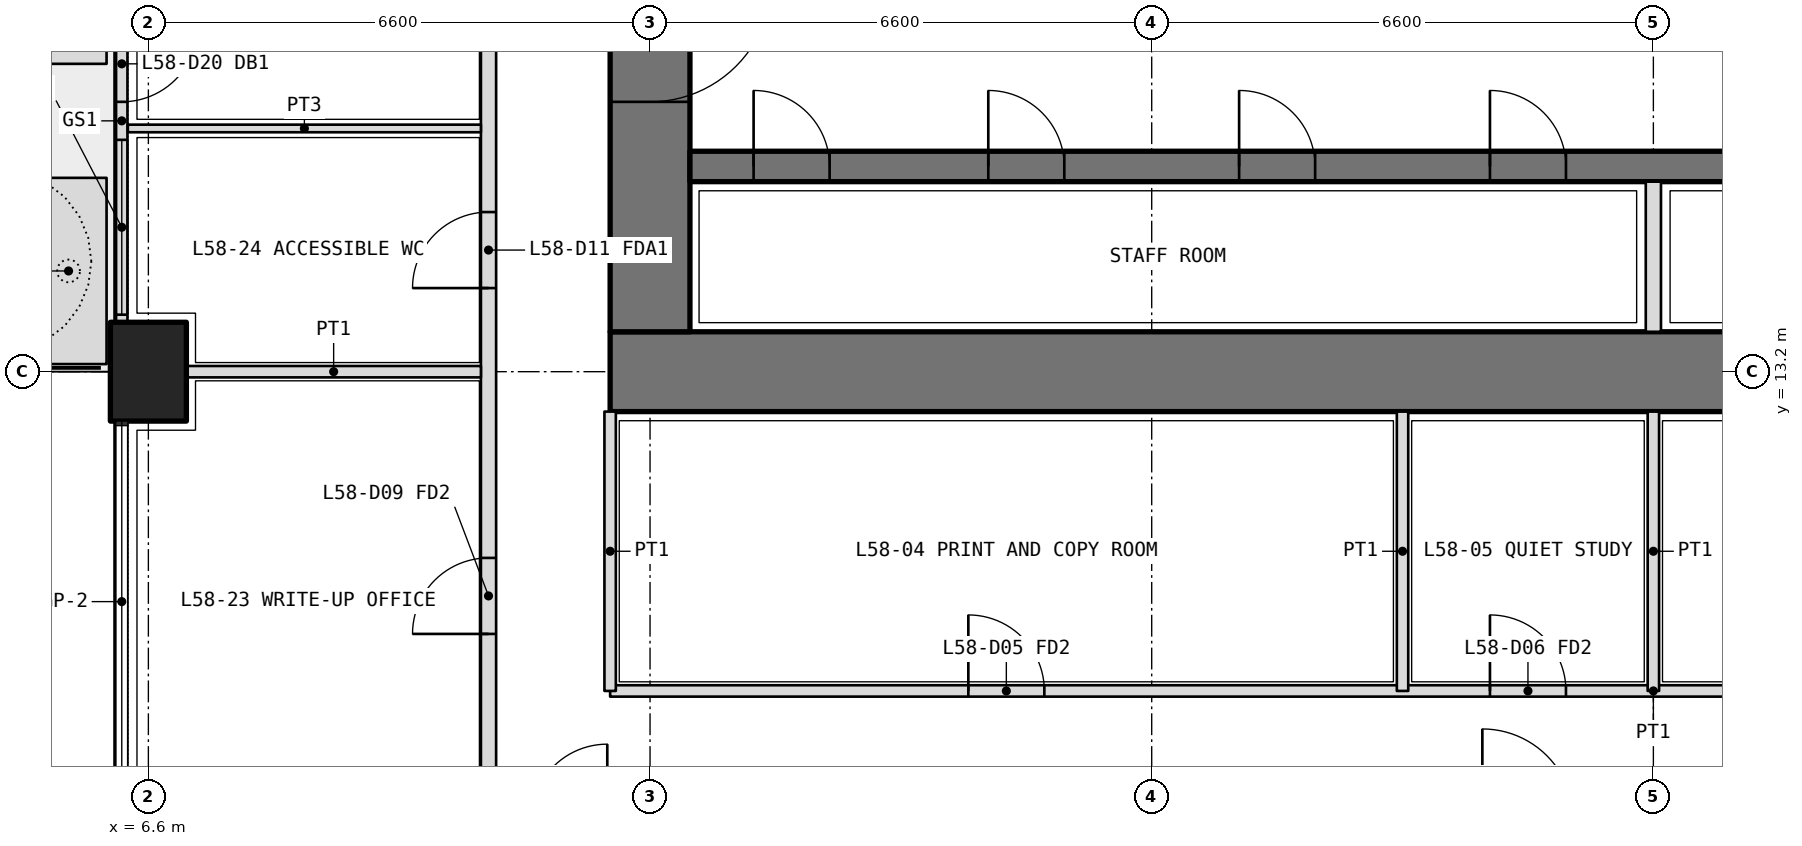
"""IFC4 building model, lengths in metres.
Left out: names, types, materials, properties, quantities, classifications, styles, units other than length and angle.
Written with IfcOpenShell. Run it as: python <this file> out.ifc"""

import sys

from ifc_helpers import new_model, si_unit, direction, frame, frame_2d, origin, origin_2d, place, context, subcontext, project, spatial, polyline, rectangle, outline, extrude, element, fill, save


model = new_model("IFC4")
c1 = context("Model", 3, precision=1e-05, world=origin(), true_north=direction((0.0, 1.0)))
c2 = subcontext(c1, "Body", "Model", "MODEL_VIEW")
j1 = project(units=[si_unit("LENGTHUNIT", "METRE"), si_unit("PLANEANGLEUNIT", "RADIAN")], contexts=[c1])
p1 = place(None, origin())
s1 = spatial("IfcSite", under=j1, at=p1, CompositionType="ELEMENT")
p2 = place(p1, origin())
s2 = spatial("IfcBuilding", under=s1, at=p2, CompositionType="ELEMENT")
p3 = place(p2, frame((0.0, 0.0, 254.4)))
s3 = spatial("IfcBuildingStorey", under=s2, at=p3, CompositionType="ELEMENT", Elevation=254.4)
p4 = place(p3, frame((6.6, 13.2, 0.0), z_axis=(0.0, 0.0, 1.0), x_axis=(0.0, 1.0, 0.0)))
e1 = element("IfcColumn", 1, at=p4, inside=s3, PredefinedType="COLUMN", context=c2, shape_type="SweptSolid", body=[
    extrude(rectangle(XDim=1.3, YDim=1.0, at=origin_2d()), origin(), (0.0, 0.0, 1.0), 4.2),
])
p5 = place(p3, origin())
e2 = element("IfcWall", 2, at=p5, inside=s3, PredefinedType="USERDEFINED", context=c2, shape_type="SweptSolid", body=[
    extrude(outline(polyline([(5.05, 13.3), (6.05, 13.3), (6.05, 15.75), (5.05, 15.75), (5.05, 13.3)]), holes=[polyline([(5.2, 13.45), (5.9, 13.45), (5.9, 15.6), (5.2, 15.6), (5.2, 13.45)])]), origin(), (0.0, 0.0, 1.0), 1.05),
])
p6 = place(p3, origin())
e3 = element("IfcWall", 3, at=p6, inside=s3, PredefinedType="USERDEFINED", context=c2, shape_type="SweptSolid", body=[
    extrude(outline(polyline([(5.05, 17.25), (6.05, 17.25), (6.05, 26.3), (5.05, 26.3), (5.05, 17.25)]), holes=[polyline([(5.2, 17.4), (5.9, 17.4), (5.9, 26.15), (5.2, 26.15), (5.2, 17.4)])]), origin(), (0.0, 0.0, 1.0), 1.05),
])
p7 = place(p3, frame((6.25, 19.15, 0.0), z_axis=(0.0, 0.0, 1.0), x_axis=(0.0, -1.0, 0.0)))
e4 = element("IfcWall", 4, at=p7, inside=s3, PredefinedType="SOLIDWALL", context=c2, shape_type="SweptSolid", body=[
    extrude(rectangle(XDim=5.3, YDim=0.15, at=frame_2d((2.65, 0.0))), origin(), (0.0, 0.0, 1.0), 2.7),
])
p8 = place(p7, frame((1.4, 0.0, 0.0)))
e5 = element("IfcOpeningElement", 5, at=p8, cuts=e4, PredefinedType="OPENING", context=c2, shape_type="SweptSolid", body=[
    extrude(rectangle(XDim=1.0, YDim=2.4, at=frame_2d((0.5, 1.2))), frame((0.0, 0.085, 0.0), z_axis=(0.0, -1.0, 0.0), x_axis=(1.0, 0.0, 0.0)), (0.0, 0.0, 1.0), 0.17),
])
p9 = place(p7, frame((0.1, 0.0, 0.1)))
e6 = element("IfcOpeningElement", 6, at=p9, cuts=e4, PredefinedType="OPENING", context=c2, shape_type="SweptSolid", body=[
    extrude(rectangle(XDim=1.2, YDim=2.3, at=frame_2d((0.6, 1.15))), frame((0.0, 0.085, 0.0), z_axis=(0.0, -1.0, 0.0), x_axis=(1.0, 0.0, 0.0)), (0.0, 0.0, 1.0), 0.17),
])
p10 = place(p7, frame((2.9, 0.0, 0.1)))
e7 = element("IfcOpeningElement", 7, at=p10, cuts=e4, PredefinedType="OPENING", context=c2, shape_type="SweptSolid", body=[
    extrude(rectangle(XDim=2.3, YDim=2.3, at=frame_2d((1.15, 1.15))), frame((0.0, 0.085, 0.0), z_axis=(0.0, -1.0, 0.0), x_axis=(1.0, 0.0, 0.0)), (0.0, 0.0, 1.0), 0.17),
])
p11 = place(p3, frame((12.675, 13.2, 0.0), z_axis=(0.0, 0.0, 1.0), x_axis=(1.0, 0.0, 0.0)))
e8 = element("IfcWall", 8, at=p11, inside=s3, PredefinedType="SHEAR", context=c2, shape_type="SweptSolid", body=[
    extrude(rectangle(XDim=27.45, YDim=1.05, at=frame_2d((13.725, 0.0))), origin(), (0.0, 0.0, 1.0), 4.2),
])
p12 = place(p3, frame((13.2, 32.475, 0.0), z_axis=(0.0, 0.0, 1.0), x_axis=(0.0, -1.0, 0.0)))
e9 = element("IfcWall", 9, at=p12, inside=s3, PredefinedType="SHEAR", context=c2, shape_type="SweptSolid", body=[
    extrude(rectangle(XDim=18.75, YDim=1.05, at=frame_2d((9.375, 0.0))), origin(), (0.0, 0.0, 1.0), 4.2),
])
p13 = place(p12, frame((14.125, 0.0, 0.0)))
e10 = element("IfcOpeningElement", 10, at=p13, cuts=e9, PredefinedType="OPENING", context=c2, shape_type="SweptSolid", body=[
    extrude(rectangle(XDim=1.6, YDim=2.1, at=frame_2d((0.8, 1.05))), frame((0.0, 0.535, 0.0), z_axis=(0.0, -1.0, 0.0), x_axis=(1.0, 0.0, 0.0)), (0.0, 0.0, 1.0), 1.07),
])
p14 = place(p12, frame((3.325, 0.0, 0.0)))
e11 = element("IfcOpeningElement", 11, at=p14, cuts=e9, PredefinedType="OPENING", context=c2, shape_type="SweptSolid", body=[
    extrude(rectangle(XDim=1.6, YDim=2.1, at=frame_2d((0.8, 1.05))), frame((0.0, 0.535, 0.0), z_axis=(0.0, -1.0, 0.0), x_axis=(1.0, 0.0, 0.0)), (0.0, 0.0, 1.0), 1.07),
])
p15 = place(p3, frame((13.725, 15.9, 0.0), z_axis=(0.0, 0.0, 1.0), x_axis=(1.0, 0.0, 0.0)))
e12 = element("IfcWall", 12, at=p15, inside=s3, PredefinedType="SHEAR", context=c2, shape_type="SweptSolid", body=[
    extrude(rectangle(XDim=25.35, YDim=0.4, at=frame_2d((12.675, 0.0))), origin(), (0.0, 0.0, 1.0), 4.2),
])
p16 = place(p15, frame((0.837, 0.0, 0.0)))
e13 = element("IfcOpeningElement", 13, at=p16, cuts=e12, PredefinedType="OPENING", context=c2, shape_type="SweptSolid", body=[
    extrude(rectangle(XDim=1.0, YDim=2.1, at=frame_2d((0.5, 1.05))), frame((0.0, 0.21, 0.0), z_axis=(0.0, -1.0, 0.0), x_axis=(1.0, 0.0, 0.0)), (0.0, 0.0, 1.0), 0.42),
])
p17 = place(p15, frame((3.925, 0.0, 0.0)))
e14 = element("IfcOpeningElement", 14, at=p17, cuts=e12, PredefinedType="OPENING", context=c2, shape_type="SweptSolid", body=[
    extrude(rectangle(XDim=1.0, YDim=2.1, at=frame_2d((0.5, 1.05))), frame((0.0, 0.21, 0.0), z_axis=(0.0, -1.0, 0.0), x_axis=(1.0, 0.0, 0.0)), (0.0, 0.0, 1.0), 0.42),
])
p18 = place(p15, frame((7.225, 0.0, 0.0)))
e15 = element("IfcOpeningElement", 15, at=p18, cuts=e12, PredefinedType="OPENING", context=c2, shape_type="SweptSolid", body=[
    extrude(rectangle(XDim=1.0, YDim=2.1, at=frame_2d((0.5, 1.05))), frame((0.0, 0.21, 0.0), z_axis=(0.0, -1.0, 0.0), x_axis=(1.0, 0.0, 0.0)), (0.0, 0.0, 1.0), 0.42),
])
p19 = place(p15, frame((10.525, 0.0, 0.0)))
e16 = element("IfcOpeningElement", 16, at=p19, cuts=e12, PredefinedType="OPENING", context=c2, shape_type="SweptSolid", body=[
    extrude(rectangle(XDim=1.0, YDim=2.1, at=frame_2d((0.5, 1.05))), frame((0.0, 0.21, 0.0), z_axis=(0.0, -1.0, 0.0), x_axis=(1.0, 0.0, 0.0)), (0.0, 0.0, 1.0), 0.42),
])
p20 = place(p15, frame((13.825, 0.0, 0.0)))
e17 = element("IfcOpeningElement", 17, at=p20, cuts=e12, PredefinedType="OPENING", context=c2, shape_type="SweptSolid", body=[
    extrude(rectangle(XDim=1.0, YDim=2.1, at=frame_2d((0.5, 1.05))), frame((0.0, 0.21, 0.0), z_axis=(0.0, -1.0, 0.0), x_axis=(1.0, 0.0, 0.0)), (0.0, 0.0, 1.0), 0.42),
])
p21 = place(p15, frame((17.125, 0.0, 0.0)))
e18 = element("IfcOpeningElement", 18, at=p21, cuts=e12, PredefinedType="OPENING", context=c2, shape_type="SweptSolid", body=[
    extrude(rectangle(XDim=1.0, YDim=2.1, at=frame_2d((0.5, 1.05))), frame((0.0, 0.21, 0.0), z_axis=(0.0, -1.0, 0.0), x_axis=(1.0, 0.0, 0.0)), (0.0, 0.0, 1.0), 0.42),
])
p22 = place(p15, frame((20.425, 0.0, 0.0)))
e19 = element("IfcOpeningElement", 19, at=p22, cuts=e12, PredefinedType="OPENING", context=c2, shape_type="SweptSolid", body=[
    extrude(rectangle(XDim=1.0, YDim=2.1, at=frame_2d((0.5, 1.05))), frame((0.0, 0.21, 0.0), z_axis=(0.0, -1.0, 0.0), x_axis=(1.0, 0.0, 0.0)), (0.0, 0.0, 1.0), 0.42),
])
p23 = place(p15, frame((23.512, 0.0, 0.0)))
e20 = element("IfcOpeningElement", 20, at=p23, cuts=e12, PredefinedType="OPENING", context=c2, shape_type="SweptSolid", body=[
    extrude(rectangle(XDim=1.0, YDim=2.1, at=frame_2d((0.5, 1.05))), frame((0.0, 0.21, 0.0), z_axis=(0.0, -1.0, 0.0), x_axis=(1.0, 0.0, 0.0)), (0.0, 0.0, 1.0), 0.42),
])
p24 = place(p3, frame((26.4, 13.725, 0.0), z_axis=(0.0, 0.0, 1.0), x_axis=(0.0, 1.0, 0.0)))
e21 = element("IfcWall", 21, at=p24, inside=s3, PredefinedType="PARTITIONING", context=c2, shape_type="SweptSolid", body=[
    extrude(rectangle(XDim=1.975, YDim=0.2, at=frame_2d((0.987, 0.0))), origin(), (0.0, 0.0, 1.0), 4.2),
])
p25 = place(p3, frame((12.675, 9.0, 0.0), z_axis=(0.0, 0.0, 1.0), x_axis=(1.0, 0.0, 0.0)))
e22 = element("IfcWall", 22, at=p25, inside=s3, PredefinedType="PARTITIONING", context=c2, shape_type="SweptSolid", body=[
    extrude(rectangle(XDim=27.45, YDim=0.15, at=frame_2d((13.725, 0.0))), origin(), (0.0, 0.0, 1.0), 3.0),
])
p26 = place(p25, frame((4.712, 0.0, 0.0)))
e23 = element("IfcOpeningElement", 23, at=p26, cuts=e22, PredefinedType="OPENING", context=c2, shape_type="SweptSolid", body=[
    extrude(rectangle(XDim=1.0, YDim=2.1, at=frame_2d((0.5, 1.05))), frame((0.0, 0.085, 0.0), z_axis=(0.0, -1.0, 0.0), x_axis=(1.0, 0.0, 0.0)), (0.0, 0.0, 1.0), 0.17),
])
p27 = place(p25, frame((11.575, 0.0, 0.0)))
e24 = element("IfcOpeningElement", 24, at=p27, cuts=e22, PredefinedType="OPENING", context=c2, shape_type="SweptSolid", body=[
    extrude(rectangle(XDim=1.0, YDim=2.1, at=frame_2d((0.5, 1.05))), frame((0.0, 0.085, 0.0), z_axis=(0.0, -1.0, 0.0), x_axis=(1.0, 0.0, 0.0)), (0.0, 0.0, 1.0), 0.17),
])
p28 = place(p25, frame((18.175, 0.0, 0.0)))
e25 = element("IfcOpeningElement", 25, at=p28, cuts=e22, PredefinedType="OPENING", context=c2, shape_type="SweptSolid", body=[
    extrude(rectangle(XDim=1.0, YDim=2.1, at=frame_2d((0.5, 1.05))), frame((0.0, 0.085, 0.0), z_axis=(0.0, -1.0, 0.0), x_axis=(1.0, 0.0, 0.0)), (0.0, 0.0, 1.0), 0.17),
])
p29 = place(p25, frame((25.038, 0.0, 0.0)))
e26 = element("IfcOpeningElement", 26, at=p29, cuts=e22, PredefinedType="OPENING", context=c2, shape_type="SweptSolid", body=[
    extrude(rectangle(XDim=1.0, YDim=2.1, at=frame_2d((0.5, 1.05))), frame((0.0, 0.085, 0.0), z_axis=(0.0, -1.0, 0.0), x_axis=(1.0, 0.0, 0.0)), (0.0, 0.0, 1.0), 0.17),
])
p30 = place(p3, frame((12.675, 12.675, 0.0), z_axis=(0.0, 0.0, 1.0), x_axis=(0.0, -1.0, 0.0)))
e27 = element("IfcWall", 27, at=p30, inside=s3, PredefinedType="PARTITIONING", context=c2, shape_type="SweptSolid", body=[
    extrude(rectangle(XDim=3.675, YDim=0.15, at=frame_2d((1.837, 0.0))), origin(), (0.0, 0.0, 1.0), 3.0),
])
p31 = place(p3, frame((23.1, 12.675, 0.0), z_axis=(0.0, 0.0, 1.0), x_axis=(0.0, -1.0, 0.0)))
e28 = element("IfcWall", 28, at=p31, inside=s3, PredefinedType="PARTITIONING", context=c2, shape_type="SweptSolid", body=[
    extrude(rectangle(XDim=3.675, YDim=0.15, at=frame_2d((1.837, 0.0))), origin(), (0.0, 0.0, 1.0), 3.9),
])
p32 = place(p3, frame((26.4, 12.675, 0.0), z_axis=(0.0, 0.0, 1.0), x_axis=(0.0, -1.0, 0.0)))
e29 = element("IfcWall", 29, at=p32, inside=s3, PredefinedType="PARTITIONING", context=c2, shape_type="SweptSolid", body=[
    extrude(rectangle(XDim=3.675, YDim=0.15, at=frame_2d((1.837, 0.0))), origin(), (0.0, 0.0, 1.0), 3.0),
])
p33 = place(p3, frame((11.075, 7.4, 0.0), z_axis=(0.0, 0.0, 1.0), x_axis=(0.0, 1.0, 0.0)))
e30 = element("IfcWall", 30, at=p33, inside=s3, PredefinedType="PARTITIONING", context=c2, shape_type="SweptSolid", body=[
    extrude(rectangle(XDim=31.4, YDim=0.2, at=frame_2d((15.7, 0.0))), origin(), (0.0, 0.0, 1.0), 3.0),
])
p34 = place(p33, frame((2.35, 0.0, 0.0)))
e31 = element("IfcOpeningElement", 31, at=p34, cuts=e30, PredefinedType="OPENING", context=c2, shape_type="SweptSolid", body=[
    extrude(rectangle(XDim=1.0, YDim=2.1, at=frame_2d((0.5, 1.05))), frame((0.0, 0.11, 0.0), z_axis=(0.0, -1.0, 0.0), x_axis=(1.0, 0.0, 0.0)), (0.0, 0.0, 1.0), 0.22),
])
p35 = place(p33, frame((6.9, 0.0, 0.0)))
e32 = element("IfcOpeningElement", 32, at=p35, cuts=e30, PredefinedType="OPENING", context=c2, shape_type="SweptSolid", body=[
    extrude(rectangle(XDim=1.0, YDim=2.1, at=frame_2d((0.5, 1.05))), frame((0.0, 0.11, 0.0), z_axis=(0.0, -1.0, 0.0), x_axis=(1.0, 0.0, 0.0)), (0.0, 0.0, 1.0), 0.22),
])
p36 = place(p33, frame((10.35, 0.0, 0.0)))
e33 = element("IfcOpeningElement", 33, at=p36, cuts=e30, PredefinedType="OPENING", context=c2, shape_type="SweptSolid", body=[
    extrude(rectangle(XDim=0.9, YDim=2.1, at=frame_2d((0.45, 1.05))), frame((0.0, 0.11, 0.0), z_axis=(0.0, -1.0, 0.0), x_axis=(1.0, 0.0, 0.0)), (0.0, 0.0, 1.0), 0.22),
])
p37 = place(p33, frame((13.7, 0.0, 0.0)))
e34 = element("IfcOpeningElement", 34, at=p37, cuts=e30, PredefinedType="OPENING", context=c2, shape_type="SweptSolid", body=[
    extrude(rectangle(XDim=0.9, YDim=2.1, at=frame_2d((0.45, 1.05))), frame((0.0, 0.11, 0.0), z_axis=(0.0, -1.0, 0.0), x_axis=(1.0, 0.0, 0.0)), (0.0, 0.0, 1.0), 0.22),
])
p38 = place(p33, frame((16.85, 0.0, 0.0)))
e35 = element("IfcOpeningElement", 35, at=p38, cuts=e30, PredefinedType="OPENING", context=c2, shape_type="SweptSolid", body=[
    extrude(rectangle(XDim=1.0, YDim=2.1, at=frame_2d((0.5, 1.05))), frame((0.0, 0.11, 0.0), z_axis=(0.0, -1.0, 0.0), x_axis=(1.0, 0.0, 0.0)), (0.0, 0.0, 1.0), 0.22),
])
p39 = place(p33, frame((24.75, 0.0, 0.0)))
e36 = element("IfcOpeningElement", 36, at=p39, cuts=e30, PredefinedType="OPENING", context=c2, shape_type="SweptSolid", body=[
    extrude(rectangle(XDim=1.0, YDim=2.1, at=frame_2d((0.5, 1.05))), frame((0.0, 0.11, 0.0), z_axis=(0.0, -1.0, 0.0), x_axis=(1.0, 0.0, 0.0)), (0.0, 0.0, 1.0), 0.22),
])
p40 = place(p3, frame((6.33, 16.4, 0.0), z_axis=(0.0, 0.0, 1.0), x_axis=(1.0, 0.0, 0.0)))
e37 = element("IfcWall", 37, at=p40, inside=s3, PredefinedType="PARTITIONING", context=c2, shape_type="SweptSolid", body=[
    extrude(rectangle(XDim=4.645, YDim=0.1, at=frame_2d((2.323, 0.0))), origin(), (0.0, 0.0, 1.0), 2.7),
])
p41 = place(p3, frame((7.1, 13.2, 0.0), z_axis=(0.0, 0.0, 1.0), x_axis=(1.0, 0.0, 0.0)))
e38 = element("IfcWall", 38, at=p41, inside=s3, PredefinedType="PARTITIONING", context=c2, shape_type="SweptSolid", body=[
    extrude(rectangle(XDim=3.875, YDim=0.15, at=frame_2d((1.938, 0.0))), origin(), (0.0, 0.0, 1.0), 3.0),
])
p42 = place(p8, origin())
e39 = element("IfcDoor", 39, at=p42, inside=s3, OperationType="SINGLE_SWING_LEFT", PredefinedType="DOOR", context=c2, shape_type="SweptSolid", body=[
    extrude(rectangle(XDim=1.0, YDim=2.4, at=frame_2d((0.5, 1.2))), frame((0.0, 0.025, 0.0), z_axis=(0.0, -1.0, 0.0), x_axis=(1.0, 0.0, 0.0)), (0.0, 0.0, 1.0), 0.05),
])
fill(e5, e39)
p43 = place(p10, origin())
e40 = element("IfcWindow", 40, at=p43, inside=s3, PartitioningType="SINGLE_PANEL", PredefinedType="WINDOW", context=c2, shape_type="SweptSolid", body=[
    extrude(rectangle(XDim=2.3, YDim=2.3, at=frame_2d((1.15, 1.15))), frame((0.0, 0.03, 0.0), z_axis=(0.0, -1.0, 0.0), x_axis=(1.0, 0.0, 0.0)), (0.0, 0.0, 1.0), 0.06),
])
fill(e7, e40)
p44 = place(p26, origin())
e41 = element("IfcDoor", 41, at=p44, inside=s3, OperationType="SINGLE_SWING_LEFT", PredefinedType="DOOR", context=c2, shape_type="SweptSolid", body=[
    extrude(rectangle(XDim=1.0, YDim=2.1, at=frame_2d((0.5, 1.05))), frame((0.0, 0.025, 0.0), z_axis=(0.0, -1.0, 0.0), x_axis=(1.0, 0.0, 0.0)), (0.0, 0.0, 1.0), 0.05),
])
fill(e23, e41)
p45 = place(p27, origin())
e42 = element("IfcDoor", 42, at=p45, inside=s3, OperationType="SINGLE_SWING_LEFT", PredefinedType="DOOR", context=c2, shape_type="SweptSolid", body=[
    extrude(rectangle(XDim=1.0, YDim=2.1, at=frame_2d((0.5, 1.05))), frame((0.0, 0.025, 0.0), z_axis=(0.0, -1.0, 0.0), x_axis=(1.0, 0.0, 0.0)), (0.0, 0.0, 1.0), 0.05),
])
fill(e24, e42)
p46 = place(p34, origin())
e43 = element("IfcDoor", 43, at=p46, inside=s3, OperationType="SINGLE_SWING_LEFT", PredefinedType="DOOR", context=c2, shape_type="SweptSolid", body=[
    extrude(rectangle(XDim=1.0, YDim=2.1, at=frame_2d((0.5, 1.05))), frame((0.0, 0.025, 0.0), z_axis=(0.0, -1.0, 0.0), x_axis=(1.0, 0.0, 0.0)), (0.0, 0.0, 1.0), 0.05),
])
fill(e31, e43)
p47 = place(p35, origin())
e44 = element("IfcDoor", 44, at=p47, inside=s3, OperationType="SINGLE_SWING_LEFT", PredefinedType="DOOR", context=c2, shape_type="SweptSolid", body=[
    extrude(rectangle(XDim=1.0, YDim=2.1, at=frame_2d((0.5, 1.05))), frame((0.0, 0.025, 0.0), z_axis=(0.0, -1.0, 0.0), x_axis=(1.0, 0.0, 0.0)), (0.0, 0.0, 1.0), 0.05),
])
fill(e32, e44)
p48 = place(p16, origin())
e45 = element("IfcDoor", 45, at=p48, inside=s3, OperationType="SINGLE_SWING_LEFT", PredefinedType="DOOR", context=c2, shape_type="SweptSolid", body=[
    extrude(rectangle(XDim=1.0, YDim=2.1, at=frame_2d((0.5, 1.05))), frame((0.0, 0.025, 0.0), z_axis=(0.0, -1.0, 0.0), x_axis=(1.0, 0.0, 0.0)), (0.0, 0.0, 1.0), 0.05),
])
fill(e13, e45)
p49 = place(p17, origin())
e46 = element("IfcDoor", 46, at=p49, inside=s3, OperationType="SINGLE_SWING_LEFT", PredefinedType="DOOR", context=c2, shape_type="SweptSolid", body=[
    extrude(rectangle(XDim=1.0, YDim=2.1, at=frame_2d((0.5, 1.05))), frame((0.0, 0.025, 0.0), z_axis=(0.0, -1.0, 0.0), x_axis=(1.0, 0.0, 0.0)), (0.0, 0.0, 1.0), 0.05),
])
fill(e14, e46)
p50 = place(p18, origin())
e47 = element("IfcDoor", 47, at=p50, inside=s3, OperationType="SINGLE_SWING_LEFT", PredefinedType="DOOR", context=c2, shape_type="SweptSolid", body=[
    extrude(rectangle(XDim=1.0, YDim=2.1, at=frame_2d((0.5, 1.05))), frame((0.0, 0.025, 0.0), z_axis=(0.0, -1.0, 0.0), x_axis=(1.0, 0.0, 0.0)), (0.0, 0.0, 1.0), 0.05),
])
fill(e15, e47)
p51 = place(p19, origin())
e48 = element("IfcDoor", 48, at=p51, inside=s3, OperationType="SINGLE_SWING_LEFT", PredefinedType="DOOR", context=c2, shape_type="SweptSolid", body=[
    extrude(rectangle(XDim=1.0, YDim=2.1, at=frame_2d((0.5, 1.05))), frame((0.0, 0.025, 0.0), z_axis=(0.0, -1.0, 0.0), x_axis=(1.0, 0.0, 0.0)), (0.0, 0.0, 1.0), 0.05),
])
fill(e16, e48)
p52 = place(p13, origin())
e49 = element("IfcDoor", 49, at=p52, inside=s3, OperationType="DOUBLE_DOOR_DOUBLE_SWING", PredefinedType="DOOR", context=c2, shape_type="SweptSolid", body=[
    extrude(rectangle(XDim=1.6, YDim=2.1, at=frame_2d((0.8, 1.05))), frame((0.0, 0.025, 0.0), z_axis=(0.0, -1.0, 0.0), x_axis=(1.0, 0.0, 0.0)), (0.0, 0.0, 1.0), 0.05),
])
fill(e10, e49)
save(model, sys.argv[1])
